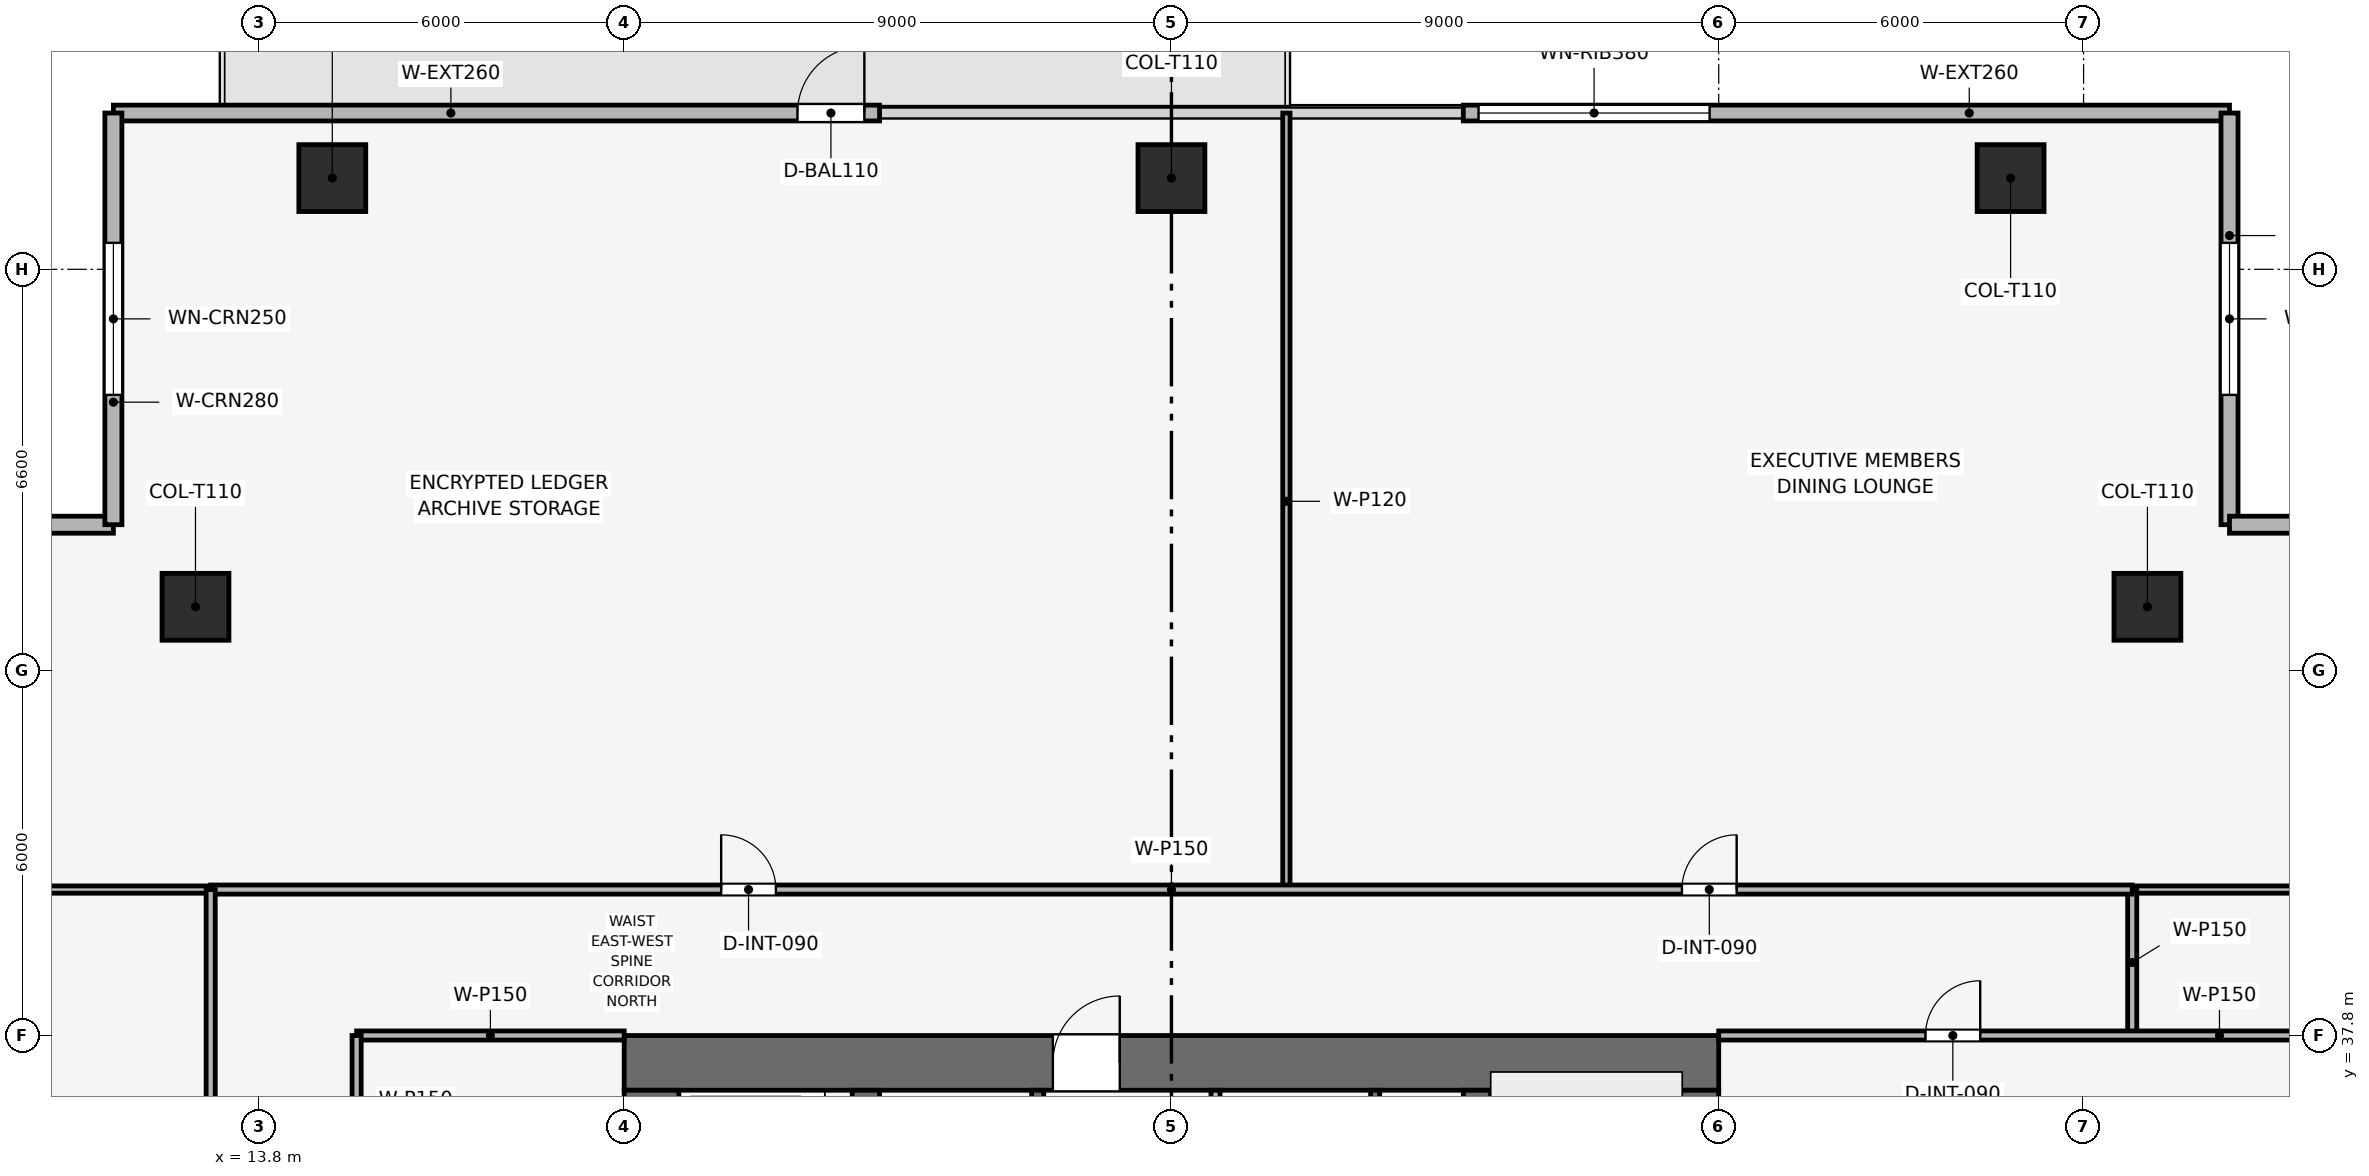
"""IFC4 building model, lengths in metres.
Left out: names, types, materials, properties, quantities, classifications, styles, units other than length and angle.
Written with IfcOpenShell. Run it as: python <this file> out.ifc"""

import sys

from ifc_helpers import new_model, si_unit, direction, frame, frame_2d, origin, origin_2d, place, context, subcontext, project, spatial, rectangle, extrude, element, fill, save


model = new_model("IFC4")
c1 = context("Model", 3, precision=1e-05, world=origin(), true_north=direction((0.0, 1.0)))
c2 = subcontext(c1, "Body", "Model", "MODEL_VIEW")
j1 = project(units=[si_unit("LENGTHUNIT", "METRE"), si_unit("PLANEANGLEUNIT", "RADIAN")], contexts=[c1])
p1 = place(None, origin())
s1 = spatial("IfcSite", under=j1, at=p1, CompositionType="ELEMENT")
p2 = place(p1, origin())
s2 = spatial("IfcBuilding", under=s1, at=p2, CompositionType="ELEMENT")
p3 = place(p2, frame((0.0, 0.0, 168.3)))
s3 = spatial("IfcBuildingStorey", under=s2, at=p3, CompositionType="ELEMENT", Elevation=168.3)
p4 = place(p3, frame((19.8, 37.35, 0.0), z_axis=(0.0, 0.0, 1.0), x_axis=(1.0, 0.0, 0.0)))
e1 = element("IfcWall", 1, at=p4, inside=s3, PredefinedType="SHEAR", context=c2, shape_type="SweptSolid", body=[
    extrude(rectangle(XDim=18.0, YDim=0.9, at=frame_2d((9.0, 0.0))), origin(), (0.0, 0.0, 1.0), 3.75),
])
p5 = place(p4, frame((7.05, 0.0, 0.0)))
e2 = element("IfcOpeningElement", 2, at=p5, cuts=e1, PredefinedType="OPENING", context=c2, shape_type="SweptSolid", body=[
    extrude(rectangle(XDim=1.1, YDim=2.15, at=frame_2d((0.55, 1.075))), frame((0.0, 0.46, 0.0), z_axis=(0.0, -1.0, 0.0), x_axis=(1.0, 0.0, 0.0)), (0.0, 0.0, 1.0), 0.92),
])
p6 = place(p3, frame((20.25, 20.7, 0.0), z_axis=(0.0, 0.0, 1.0), x_axis=(0.0, 1.0, 0.0)))
e3 = element("IfcWall", 3, at=p6, inside=s3, PredefinedType="SHEAR", context=c2, shape_type="SweptSolid", body=[
    extrude(rectangle(XDim=16.2, YDim=0.9, at=frame_2d((8.1, 0.0))), origin(), (0.0, 0.0, 1.0), 3.75),
])
p7 = place(p6, frame((10.1, 0.0, 0.0)))
e4 = element("IfcOpeningElement", 4, at=p7, cuts=e3, PredefinedType="OPENING", context=c2, shape_type="SweptSolid", body=[
    extrude(rectangle(XDim=1.1, YDim=2.15, at=frame_2d((0.55, 1.075))), frame((0.0, 0.46, 0.0), z_axis=(0.0, -1.0, 0.0), x_axis=(1.0, 0.0, 0.0)), (0.0, 0.0, 1.0), 0.92),
])
p8 = place(p3, frame((37.35, 20.7, 0.0), z_axis=(0.0, 0.0, 1.0), x_axis=(0.0, 1.0, 0.0)))
e5 = element("IfcWall", 5, at=p8, inside=s3, PredefinedType="SHEAR", context=c2, shape_type="SweptSolid", body=[
    extrude(rectangle(XDim=16.2, YDim=0.9, at=frame_2d((8.1, 0.0))), origin(), (0.0, 0.0, 1.0), 3.75),
])
p9 = place(p8, frame((4.6, 0.0, 0.0)))
e6 = element("IfcOpeningElement", 6, at=p9, cuts=e5, PredefinedType="OPENING", context=c2, shape_type="SweptSolid", body=[
    extrude(rectangle(XDim=1.1, YDim=2.15, at=frame_2d((0.55, 1.075))), frame((0.0, 0.46, 0.0), z_axis=(0.0, -1.0, 0.0), x_axis=(1.0, 0.0, 0.0)), (0.0, 0.0, 1.0), 0.92),
])
for number, where, z_axis, x_axis in (
    (7, (23.775, 20.7, 0.0), (0.0, 0.0, 1.0), (0.0, 1.0, 0.0)),
    (8, (33.825, 20.7, 0.0), (0.0, 0.0, 1.0), (0.0, 1.0, 0.0)),
):
    element("IfcWall", number, at=place(p3, frame(where, z_axis=z_axis, x_axis=x_axis)), inside=s3, PredefinedType="SHEAR", context=c2, shape_type="SweptSolid", body=[
        extrude(rectangle(XDim=16.2, YDim=0.45, at=frame_2d((8.1, 0.0))), origin(), (0.0, 0.0, 1.0), 3.75),
    ])
for number, where, z_axis, x_axis in (
    (9, (42.6, 51.9, 0.003), (0.0, 0.0, 1.0), (1.0, 0.0, 0.0)),
    (10, (28.8, 51.9, 0.003), (0.0, 0.0, 1.0), (1.0, 0.0, 0.0)),
    (11, (15.0, 51.9, 0.003), (0.0, 0.0, 1.0), (1.0, 0.0, 0.0)),
    (12, (44.85, 44.85, 0.003), (0.0, 0.0, 1.0), (1.0, 0.0, 0.0)),
    (13, (12.75, 44.85, 0.003), (0.0, 0.0, 1.0), (1.0, 0.0, 0.0)),
):
    element("IfcColumn", number, at=place(p3, frame(where, z_axis=z_axis, x_axis=x_axis)), inside=s3, PredefinedType="COLUMN", context=c2, shape_type="SweptSolid", body=[
        extrude(rectangle(XDim=1.1, YDim=1.1, at=origin_2d()), origin(), (0.0, 0.0, 1.0), 3.489),
    ])
p10 = place(p3, frame((11.4, 52.97, 0.0), z_axis=(0.0, 0.0, 1.0), x_axis=(1.0, 0.0, 0.0)))
e14 = element("IfcWall", 14, at=p10, inside=s3, PredefinedType="SOLIDWALL", context=c2, shape_type="SweptSolid", body=[
    extrude(rectangle(XDim=12.6, YDim=0.26, at=frame_2d((6.3, 0.0))), origin(), (0.0, 0.0, 1.0), 3.495),
])
p11 = place(p10, frame((11.25, 0.0, 0.0)))
e15 = element("IfcOpeningElement", 15, at=p11, cuts=e14, PredefinedType="OPENING", context=c2, shape_type="SweptSolid", body=[
    extrude(rectangle(XDim=1.1, YDim=2.2, at=frame_2d((0.55, 1.1))), frame((0.0, 0.14, 0.0), z_axis=(0.0, -1.0, 0.0), x_axis=(1.0, 0.0, 0.0)), (0.0, 0.0, 1.0), 0.28),
])
p12 = place(p3, frame((33.6, 52.97, 0.0), z_axis=(0.0, 0.0, 1.0), x_axis=(1.0, 0.0, 0.0)))
e16 = element("IfcWall", 16, at=p12, inside=s3, PredefinedType="SOLIDWALL", context=c2, shape_type="SweptSolid", body=[
    extrude(rectangle(XDim=12.6, YDim=0.26, at=frame_2d((6.3, 0.0))), origin(), (0.0, 0.0, 1.0), 3.495),
])
p13 = place(p12, frame((0.25, 0.0, 0.9)))
e17 = element("IfcOpeningElement", 17, at=p13, cuts=e16, PredefinedType="OPENING", context=c2, shape_type="SweptSolid", body=[
    extrude(rectangle(XDim=3.8, YDim=1.9, at=frame_2d((1.9, 0.95))), frame((0.0, 0.14, 0.0), z_axis=(0.0, -1.0, 0.0), x_axis=(1.0, 0.0, 0.0)), (0.0, 0.0, 1.0), 0.28),
])
p14 = place(p3, frame((4.63, 46.2, 0.0), z_axis=(0.0, 0.0, 1.0), x_axis=(1.0, 0.0, 0.0)))
e18 = element("IfcWall", 18, at=p14, inside=s3, PredefinedType="SOLIDWALL", context=c2, shape_type="SweptSolid", body=[
    extrude(rectangle(XDim=6.77, YDim=0.28, at=frame_2d((3.385, 0.0))), origin(), (0.0, 0.0, 1.0), 3.495),
])
p15 = place(p14, frame((2.135, 0.0, 0.9)))
e19 = element("IfcOpeningElement", 19, at=p15, cuts=e18, PredefinedType="OPENING", context=c2, shape_type="SweptSolid", body=[
    extrude(rectangle(XDim=2.5, YDim=1.9, at=frame_2d((1.25, 0.95))), frame((0.0, 0.15, 0.0), z_axis=(0.0, -1.0, 0.0), x_axis=(1.0, 0.0, 0.0)), (0.0, 0.0, 1.0), 0.3),
])
p16 = place(p3, frame((11.4, 46.2, 0.0), z_axis=(0.0, 0.0, 1.0), x_axis=(0.0, 1.0, 0.0)))
e20 = element("IfcWall", 20, at=p16, inside=s3, PredefinedType="SOLIDWALL", context=c2, shape_type="SweptSolid", body=[
    extrude(rectangle(XDim=6.77, YDim=0.28, at=frame_2d((3.385, 0.0))), origin(), (0.0, 0.0, 1.0), 3.495),
])
p17 = place(p16, frame((2.135, 0.0, 0.9)))
e21 = element("IfcOpeningElement", 21, at=p17, cuts=e20, PredefinedType="OPENING", context=c2, shape_type="SweptSolid", body=[
    extrude(rectangle(XDim=2.5, YDim=1.9, at=frame_2d((1.25, 0.95))), frame((0.0, 0.15, 0.0), z_axis=(0.0, -1.0, 0.0), x_axis=(1.0, 0.0, 0.0)), (0.0, 0.0, 1.0), 0.3),
])
p18 = place(p3, frame((46.2, 52.97, 0.0), z_axis=(0.0, 0.0, 1.0), x_axis=(0.0, -1.0, 0.0)))
e22 = element("IfcWall", 22, at=p18, inside=s3, PredefinedType="SOLIDWALL", context=c2, shape_type="SweptSolid", body=[
    extrude(rectangle(XDim=6.77, YDim=0.28, at=frame_2d((3.385, 0.0))), origin(), (0.0, 0.0, 1.0), 3.495),
])
p19 = place(p18, frame((2.135, 0.0, 0.9)))
e23 = element("IfcOpeningElement", 23, at=p19, cuts=e22, PredefinedType="OPENING", context=c2, shape_type="SweptSolid", body=[
    extrude(rectangle(XDim=2.5, YDim=1.9, at=frame_2d((1.25, 0.95))), frame((0.0, 0.15, 0.0), z_axis=(0.0, -1.0, 0.0), x_axis=(1.0, 0.0, 0.0)), (0.0, 0.0, 1.0), 0.3),
])
p20 = place(p3, frame((46.2, 46.2, 0.0), z_axis=(0.0, 0.0, 1.0), x_axis=(1.0, 0.0, 0.0)))
e24 = element("IfcWall", 24, at=p20, inside=s3, PredefinedType="SOLIDWALL", context=c2, shape_type="SweptSolid", body=[
    extrude(rectangle(XDim=6.77, YDim=0.28, at=frame_2d((3.385, 0.0))), origin(), (0.0, 0.0, 1.0), 3.495),
])
p21 = place(p20, frame((2.135, 0.0, 0.9)))
e25 = element("IfcOpeningElement", 25, at=p21, cuts=e24, PredefinedType="OPENING", context=c2, shape_type="SweptSolid", body=[
    extrude(rectangle(XDim=2.5, YDim=1.9, at=frame_2d((1.25, 0.95))), frame((0.0, 0.15, 0.0), z_axis=(0.0, -1.0, 0.0), x_axis=(1.0, 0.0, 0.0)), (0.0, 0.0, 1.0), 0.3),
])
p22 = place(p3, frame((32.15, 34.0, 0.0), z_axis=(0.0, 0.0, 1.0), x_axis=(0.0, 1.0, 0.0)))
e26 = element("IfcWall", 26, at=p22, inside=s3, PredefinedType="SHEAR", context=c2, shape_type="SweptSolid", body=[
    extrude(rectangle(XDim=2.9, YDim=0.15, at=frame_2d((1.45, 0.0))), origin(), (0.0, 0.0, 1.0), 3.495),
])
p23 = place(p3, frame((26.6, 34.0, 0.0), z_axis=(0.0, 0.0, 1.0), x_axis=(0.0, 1.0, 0.0)))
e27 = element("IfcWall", 27, at=p23, inside=s3, PredefinedType="SHEAR", context=c2, shape_type="SweptSolid", body=[
    extrude(rectangle(XDim=2.9, YDim=0.2, at=frame_2d((1.45, 0.0))), origin(), (0.0, 0.0, 1.0), 3.495),
])
p24 = place(p23, frame((0.75, 0.0, 0.0)))
e28 = element("IfcOpeningElement", 28, at=p24, cuts=e27, PredefinedType="OPENING", context=c2, shape_type="SweptSolid", body=[
    extrude(rectangle(XDim=1.1, YDim=2.15, at=frame_2d((0.55, 1.075))), frame((0.0, 0.11, 0.0), z_axis=(0.0, -1.0, 0.0), x_axis=(1.0, 0.0, 0.0)), (0.0, 0.0, 1.0), 0.22),
])
p25 = place(p3, frame((29.525, 33.925, 0.0), z_axis=(0.0, 0.0, 1.0), x_axis=(0.0, 1.0, 0.0)))
e29 = element("IfcWall", 29, at=p25, inside=s3, PredefinedType="PARTITIONING", context=c2, shape_type="SweptSolid", body=[
    extrude(rectangle(XDim=2.975, YDim=0.15, at=frame_2d((1.487, 0.0))), origin(), (0.0, 0.0, 1.0), 3.495),
])
p26 = place(p25, frame((0.85, 0.0, 0.0)))
e30 = element("IfcOpeningElement", 30, at=p26, cuts=e29, PredefinedType="OPENING", context=c2, shape_type="SweptSolid", body=[
    extrude(rectangle(XDim=0.9, YDim=2.1, at=frame_2d((0.45, 1.05))), frame((0.0, 0.085, 0.0), z_axis=(0.0, -1.0, 0.0), x_axis=(1.0, 0.0, 0.0)), (0.0, 0.0, 1.0), 0.17),
])
p27 = place(p3, frame((15.4, 37.8, 0.0), z_axis=(0.0, 0.0, 1.0), x_axis=(1.0, 0.0, 0.0)))
e31 = element("IfcWall", 31, at=p27, inside=s3, PredefinedType="PARTITIONING", context=c2, shape_type="SweptSolid", body=[
    extrude(rectangle(XDim=4.4, YDim=0.15, at=frame_2d((2.2, 0.0))), origin(), (0.0, 0.0, 1.0), 3.03),
])
p28 = place(p3, frame((15.4, 32.45, 0.0), z_axis=(0.0, 0.0, 1.0), x_axis=(0.0, 1.0, 0.0)))
e32 = element("IfcWall", 32, at=p28, inside=s3, PredefinedType="PARTITIONING", context=c2, shape_type="SweptSolid", body=[
    extrude(rectangle(XDim=5.35, YDim=0.15, at=frame_2d((2.675, 0.0))), origin(), (0.0, 0.0, 1.0), 3.03),
])
p29 = place(p28, frame((2.1, 0.0, 0.0)))
e33 = element("IfcOpeningElement", 33, at=p29, cuts=e32, PredefinedType="OPENING", context=c2, shape_type="SweptSolid", body=[
    extrude(rectangle(XDim=0.9, YDim=2.1, at=frame_2d((0.45, 1.05))), frame((0.0, 0.085, 0.0), z_axis=(0.0, -1.0, 0.0), x_axis=(1.0, 0.0, 0.0)), (0.0, 0.0, 1.0), 0.17),
])
p30 = place(p3, frame((30.69, 40.2, 0.0), z_axis=(0.0, 0.0, 1.0), x_axis=(0.0, 1.0, 0.0)))
e34 = element("IfcWall", 34, at=p30, inside=s3, PredefinedType="PARTITIONING", context=c2, shape_type="SweptSolid", body=[
    extrude(rectangle(XDim=12.77, YDim=0.12, at=frame_2d((6.385, 0.0))), origin(), (0.0, 0.0, 1.0), 2.98),
])
p31 = place(p3, frame((4.63, 40.2, 0.0), z_axis=(0.0, 0.0, 1.0), x_axis=(1.0, 0.0, 0.0)))
e35 = element("IfcWall", 35, at=p31, inside=s3, PredefinedType="PARTITIONING", context=c2, shape_type="SweptSolid", body=[
    extrude(rectangle(XDim=8.37, YDim=0.12, at=frame_2d((4.185, 0.0))), origin(), (0.0, 0.0, 1.0), 2.98),
])
p32 = place(p3, frame((44.6, 40.2, 0.0), z_axis=(0.0, 0.0, 1.0), x_axis=(1.0, 0.0, 0.0)))
e36 = element("IfcWall", 36, at=p32, inside=s3, PredefinedType="PARTITIONING", context=c2, shape_type="SweptSolid", body=[
    extrude(rectangle(XDim=8.37, YDim=0.12, at=frame_2d((4.185, 0.0))), origin(), (0.0, 0.0, 1.0), 2.98),
])
p33 = place(p3, frame((44.6, 37.8, 0.0), z_axis=(0.0, 0.0, 1.0), x_axis=(0.0, 1.0, 0.0)))
e37 = element("IfcWall", 37, at=p33, inside=s3, PredefinedType="PARTITIONING", context=c2, shape_type="SweptSolid", body=[
    extrude(rectangle(XDim=2.4, YDim=0.15, at=frame_2d((1.2, 0.0))), origin(), (0.0, 0.0, 1.0), 3.495),
])
p34 = place(p3, frame((37.8, 37.8, 0.0), z_axis=(0.0, 0.0, 1.0), x_axis=(1.0, 0.0, 0.0)))
e38 = element("IfcWall", 38, at=p34, inside=s3, PredefinedType="PARTITIONING", context=c2, shape_type="SweptSolid", body=[
    extrude(rectangle(XDim=15.17, YDim=0.15, at=frame_2d((7.585, 0.0))), origin(), (0.0, 0.0, 1.0), 2.98),
])
p35 = place(p34, frame((3.4, 0.0, 0.0)))
e39 = element("IfcOpeningElement", 39, at=p35, cuts=e38, PredefinedType="OPENING", context=c2, shape_type="SweptSolid", body=[
    extrude(rectangle(XDim=0.9, YDim=2.1, at=frame_2d((0.45, 1.05))), frame((0.0, 0.085, 0.0), z_axis=(0.0, -1.0, 0.0), x_axis=(1.0, 0.0, 0.0)), (0.0, 0.0, 1.0), 0.17),
])
p36 = place(p3, frame((13.0, 40.2, 0.0), z_axis=(0.0, 0.0, 1.0), x_axis=(1.0, 0.0, 0.0)))
e40 = element("IfcWall", 40, at=p36, inside=s3, PredefinedType="PARTITIONING", context=c2, shape_type="SweptSolid", body=[
    extrude(rectangle(XDim=31.6, YDim=0.15, at=frame_2d((15.8, 0.0))), origin(), (0.0, 0.0, 1.0), 3.03),
])
p37 = place(p36, frame((8.395, 0.0, 0.0)))
e41 = element("IfcOpeningElement", 41, at=p37, cuts=e40, PredefinedType="OPENING", context=c2, shape_type="SweptSolid", body=[
    extrude(rectangle(XDim=0.9, YDim=2.1, at=frame_2d((0.45, 1.05))), frame((0.0, 0.085, 0.0), z_axis=(0.0, -1.0, 0.0), x_axis=(1.0, 0.0, 0.0)), (0.0, 0.0, 1.0), 0.17),
])
p38 = place(p36, frame((24.195, 0.0, 0.0)))
e42 = element("IfcOpeningElement", 42, at=p38, cuts=e40, PredefinedType="OPENING", context=c2, shape_type="SweptSolid", body=[
    extrude(rectangle(XDim=0.9, YDim=2.1, at=frame_2d((0.45, 1.05))), frame((0.0, 0.085, 0.0), z_axis=(0.0, -1.0, 0.0), x_axis=(1.0, 0.0, 0.0)), (0.0, 0.0, 1.0), 0.17),
])
p39 = place(p3, frame((13.0, 17.4, 0.0), z_axis=(0.0, 0.0, 1.0), x_axis=(0.0, 1.0, 0.0)))
e43 = element("IfcWall", 43, at=p39, inside=s3, PredefinedType="PARTITIONING", context=c2, shape_type="SweptSolid", body=[
    extrude(rectangle(XDim=22.8, YDim=0.15, at=frame_2d((11.4, 0.0))), origin(), (0.0, 0.0, 1.0), 3.03),
])
p40 = place(p39, frame((10.95, 0.0, 0.0)))
e44 = element("IfcOpeningElement", 44, at=p40, cuts=e43, PredefinedType="OPENING", context=c2, shape_type="SweptSolid", body=[
    extrude(rectangle(XDim=0.9, YDim=2.1, at=frame_2d((0.45, 1.05))), frame((0.0, 0.085, 0.0), z_axis=(0.0, -1.0, 0.0), x_axis=(1.0, 0.0, 0.0)), (0.0, 0.0, 1.0), 0.17),
])
p41 = place(p11, origin())
e45 = element("IfcDoor", 45, at=p41, inside=s3, OperationType="SINGLE_SWING_RIGHT", PredefinedType="DOOR", context=c2, shape_type="SweptSolid", body=[
    extrude(rectangle(XDim=1.1, YDim=2.2, at=frame_2d((0.55, 1.1))), frame((0.0, 0.025, 0.0), z_axis=(0.0, -1.0, 0.0), x_axis=(1.0, 0.0, 0.0)), (0.0, 0.0, 1.0), 0.05),
])
fill(e15, e45)
p42 = place(p13, origin())
e46 = element("IfcWindow", 46, at=p42, inside=s3, PartitioningType="SINGLE_PANEL", PredefinedType="WINDOW", context=c2, shape_type="SweptSolid", body=[
    extrude(rectangle(XDim=3.8, YDim=1.9, at=frame_2d((1.9, 0.95))), frame((0.0, 0.03, 0.0), z_axis=(0.0, -1.0, 0.0), x_axis=(1.0, 0.0, 0.0)), (0.0, 0.0, 1.0), 0.06),
])
fill(e17, e46)
p43 = place(p17, origin())
e47 = element("IfcWindow", 47, at=p43, inside=s3, PartitioningType="SINGLE_PANEL", PredefinedType="WINDOW", context=c2, shape_type="SweptSolid", body=[
    extrude(rectangle(XDim=2.5, YDim=1.9, at=frame_2d((1.25, 0.95))), frame((0.0, 0.03, 0.0), z_axis=(0.0, -1.0, 0.0), x_axis=(1.0, 0.0, 0.0)), (0.0, 0.0, 1.0), 0.06),
])
fill(e21, e47)
p44 = place(p19, origin())
e48 = element("IfcWindow", 48, at=p44, inside=s3, PartitioningType="SINGLE_PANEL", PredefinedType="WINDOW", context=c2, shape_type="SweptSolid", body=[
    extrude(rectangle(XDim=2.5, YDim=1.9, at=frame_2d((1.25, 0.95))), frame((0.0, 0.03, 0.0), z_axis=(0.0, -1.0, 0.0), x_axis=(1.0, 0.0, 0.0)), (0.0, 0.0, 1.0), 0.06),
])
fill(e23, e48)
p45 = place(p35, origin())
e49 = element("IfcDoor", 49, at=p45, inside=s3, OperationType="SINGLE_SWING_RIGHT", PredefinedType="DOOR", context=c2, shape_type="SweptSolid", body=[
    extrude(rectangle(XDim=0.9, YDim=2.1, at=frame_2d((0.45, 1.05))), frame((0.0, 0.025, 0.0), z_axis=(0.0, -1.0, 0.0), x_axis=(1.0, 0.0, 0.0)), (0.0, 0.0, 1.0), 0.05),
])
fill(e39, e49)
p46 = place(p37, origin())
e50 = element("IfcDoor", 50, at=p46, inside=s3, OperationType="SINGLE_SWING_LEFT", PredefinedType="DOOR", context=c2, shape_type="SweptSolid", body=[
    extrude(rectangle(XDim=0.9, YDim=2.1, at=frame_2d((0.45, 1.05))), frame((0.0, 0.025, 0.0), z_axis=(0.0, -1.0, 0.0), x_axis=(1.0, 0.0, 0.0)), (0.0, 0.0, 1.0), 0.05),
])
fill(e41, e50)
p47 = place(p38, origin())
e51 = element("IfcDoor", 51, at=p47, inside=s3, OperationType="SINGLE_SWING_RIGHT", PredefinedType="DOOR", context=c2, shape_type="SweptSolid", body=[
    extrude(rectangle(XDim=0.9, YDim=2.1, at=frame_2d((0.45, 1.05))), frame((0.0, 0.025, 0.0), z_axis=(0.0, -1.0, 0.0), x_axis=(1.0, 0.0, 0.0)), (0.0, 0.0, 1.0), 0.05),
])
fill(e42, e51)
p48 = place(p5, origin())
e52 = element("IfcDoor", 52, at=p48, inside=s3, OperationType="SINGLE_SWING_RIGHT", PredefinedType="DOOR", context=c2, shape_type="SweptSolid", body=[
    extrude(rectangle(XDim=1.1, YDim=2.15, at=frame_2d((0.55, 1.075))), frame((0.0, 0.025, 0.0), z_axis=(0.0, -1.0, 0.0), x_axis=(1.0, 0.0, 0.0)), (0.0, 0.0, 1.0), 0.05),
])
fill(e2, e52)
save(model, sys.argv[1])
